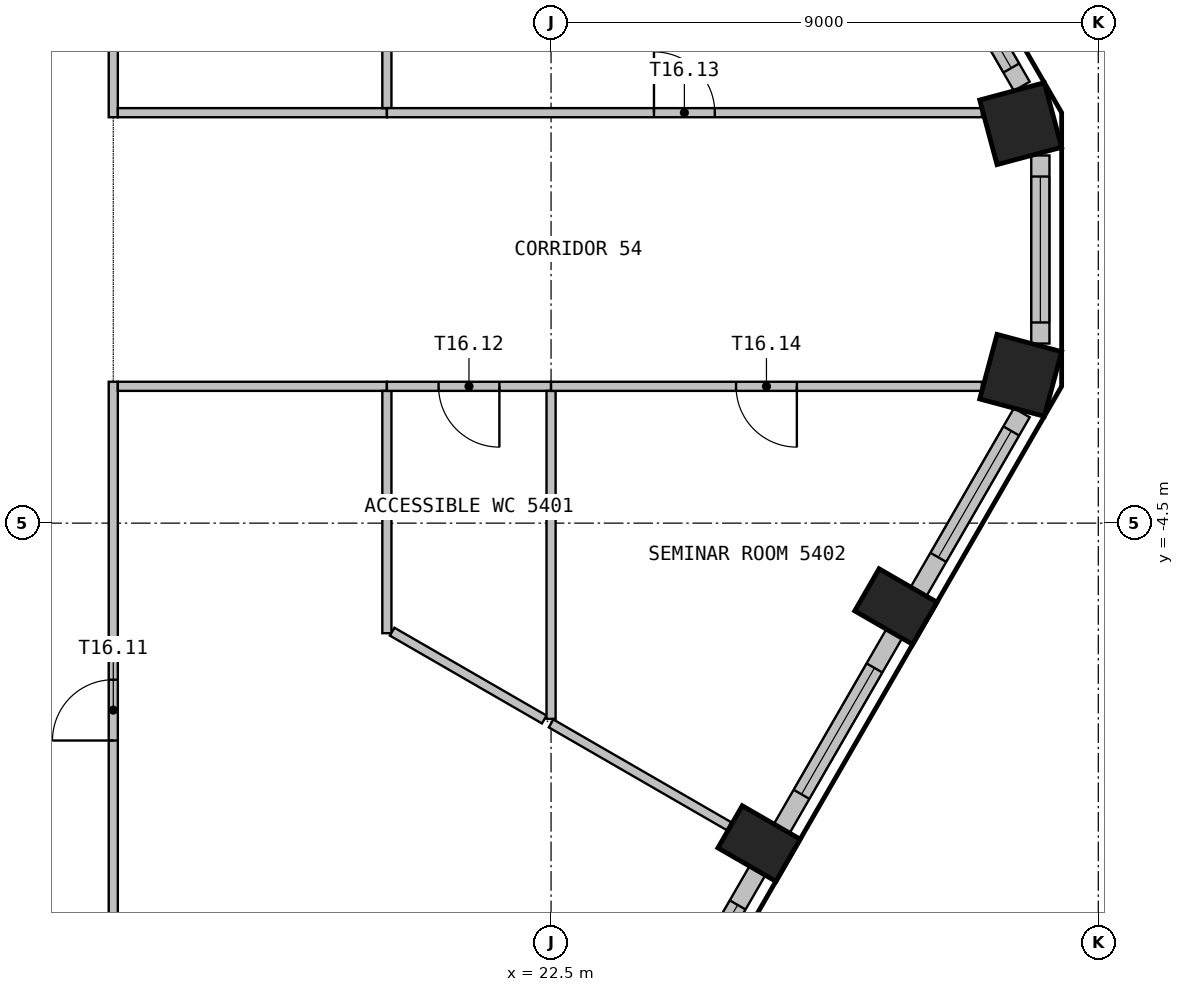
"""IFC4 building model, lengths in metres.
Left out: names, types, materials, properties, quantities, classifications, styles, units other than length and angle.
Written with IfcOpenShell. Run it as: python <this file> out.ifc"""

import sys

from ifc_helpers import new_model, si_unit, direction, frame, frame_2d, origin, origin_2d, place, context, subcontext, project, spatial, rectangle, extrude, element, fill, save


model = new_model("IFC4")
c1 = context("Model", 3, precision=1e-05, world=origin(), true_north=direction((0.0, 1.0)))
c2 = subcontext(c1, "Body", "Model", "MODEL_VIEW")
j1 = project(units=[si_unit("LENGTHUNIT", "METRE"), si_unit("PLANEANGLEUNIT", "RADIAN")], contexts=[c1])
p1 = place(None, origin())
s1 = spatial("IfcSite", under=j1, at=p1, CompositionType="ELEMENT")
p2 = place(p1, origin())
s2 = spatial("IfcBuilding", under=s1, at=p2, CompositionType="ELEMENT")
p3 = place(p2, frame((0.0, 0.0, 219.0)))
s3 = spatial("IfcBuildingStorey", under=s2, at=p3, CompositionType="ELEMENT", Elevation=219.0)
for number, where, z_axis, x_axis in (
    (1, (25.921, -9.769, 0.0), (0.0, 0.0, 1.0), (0.5, 0.866, 0.0)),
    (2, (28.171, -5.872, 0.0), (0.0, 0.0, 1.0), (0.5, 0.866, 0.0)),
):
    element("IfcColumn", number, at=place(p3, frame(where, z_axis=z_axis, x_axis=x_axis)), inside=s3, PredefinedType="COLUMN", context=c2, shape_type="SweptSolid", body=[
        extrude(rectangle(XDim=0.8, YDim=1.1, at=origin_2d()), origin(), (0.0, 0.0, 1.0), 3.55),
    ])
for number, where, z_axis, x_axis in (
    (3, (30.223, -2.07, 0.0), (0.0, 0.0, 1.0), (0.259, 0.966, 0.0)),
    (4, (30.223, 2.07, 0.0), (0.0, 0.0, 1.0), (-0.259, 0.966, 0.0)),
):
    element("IfcColumn", number, at=place(p3, frame(where, z_axis=z_axis, x_axis=x_axis)), inside=s3, PredefinedType="COLUMN", context=c2, shape_type="SweptSolid", body=[
        extrude(rectangle(XDim=1.1, YDim=1.1, at=origin_2d()), origin(), (0.0, 0.0, 1.0), 3.55),
    ])
p4 = place(p3, frame((24.044, -13.419, 0.0), z_axis=(0.0, 0.0, 1.0), x_axis=(0.500029062817, 0.866008623709, 0.0)))
e5 = element("IfcWall", 5, at=p4, inside=s3, PredefinedType="SOLIDWALL", context=c2, shape_type="SweptSolid", body=[
    extrude(rectangle(XDim=3.699, YDim=0.3, at=frame_2d((1.85, 0.0))), origin(), (0.0, 0.0, 1.0), 3.55),
])
p5 = place(p4, frame((0.649, 0.0, 0.9)))
e6 = element("IfcOpeningElement", 6, at=p5, cuts=e5, PredefinedType="OPENING", context=c2, shape_type="SweptSolid", body=[
    extrude(rectangle(XDim=2.4, YDim=2.1, at=frame_2d((1.2, 1.05))), frame((0.0, 0.16, 0.0), z_axis=(0.0, -1.0, 0.0), x_axis=(1.0, 0.0, 0.0)), (0.0, 0.0, 1.0), 0.32),
])
p6 = place(p3, frame((26.294, -9.522, 0.0), z_axis=(0.0, 0.0, 1.0), x_axis=(0.500029062817, 0.866008623709, 0.0)))
e7 = element("IfcWall", 7, at=p6, inside=s3, PredefinedType="SOLIDWALL", context=c2, shape_type="SweptSolid", body=[
    extrude(rectangle(XDim=3.699, YDim=0.3, at=frame_2d((1.85, 0.0))), origin(), (0.0, 0.0, 1.0), 3.55),
])
p7 = place(p6, frame((0.649, 0.0, 0.9)))
e8 = element("IfcOpeningElement", 8, at=p7, cuts=e7, PredefinedType="OPENING", context=c2, shape_type="SweptSolid", body=[
    extrude(rectangle(XDim=2.4, YDim=2.1, at=frame_2d((1.2, 1.05))), frame((0.0, 0.16, 0.0), z_axis=(0.0, -1.0, 0.0), x_axis=(1.0, 0.0, 0.0)), (0.0, 0.0, 1.0), 0.32),
])
p8 = place(p3, frame((28.544, -5.625, 0.0), z_axis=(0.0, 0.0, 1.0), x_axis=(0.500012868213, 0.866017974191, 0.0)))
e9 = element("IfcWall", 9, at=p8, inside=s3, PredefinedType="SOLIDWALL", context=c2, shape_type="SweptSolid", body=[
    extrude(rectangle(XDim=3.396, YDim=0.3, at=frame_2d((1.698, 0.0))), origin(), (0.0, 0.0, 1.0), 3.55),
])
p9 = place(p8, frame((0.649, 0.0, 0.9)))
e10 = element("IfcOpeningElement", 10, at=p9, cuts=e9, PredefinedType="OPENING", context=c2, shape_type="SweptSolid", body=[
    extrude(rectangle(XDim=2.4, YDim=2.1, at=frame_2d((1.2, 1.05))), frame((0.0, 0.16, 0.0), z_axis=(0.0, -1.0, 0.0), x_axis=(1.0, 0.0, 0.0)), (0.0, 0.0, 1.0), 0.32),
])
p10 = place(p3, frame((30.547, -1.546, 0.0), z_axis=(0.0, 0.0, 1.0), x_axis=(0.0, 1.0, 0.0)))
e11 = element("IfcWall", 11, at=p10, inside=s3, PredefinedType="SOLIDWALL", context=c2, shape_type="SweptSolid", body=[
    extrude(rectangle(XDim=3.093, YDim=0.3, at=frame_2d((1.546, 0.0))), origin(), (0.0, 0.0, 1.0), 3.55),
])
p11 = place(p10, frame((0.346, 0.0, 0.9)))
e12 = element("IfcOpeningElement", 12, at=p11, cuts=e11, PredefinedType="OPENING", context=c2, shape_type="SweptSolid", body=[
    extrude(rectangle(XDim=2.4, YDim=2.1, at=frame_2d((1.2, 1.05))), frame((0.0, 0.16, 0.0), z_axis=(0.0, -1.0, 0.0), x_axis=(1.0, 0.0, 0.0)), (0.0, 0.0, 1.0), 0.32),
])
p12 = place(p3, frame((30.242, 2.684, 0.0), z_axis=(0.0, 0.0, 1.0), x_axis=(-0.500012868213, 0.866017974191, 0.0)))
e13 = element("IfcWall", 13, at=p12, inside=s3, PredefinedType="SOLIDWALL", context=c2, shape_type="SweptSolid", body=[
    extrude(rectangle(XDim=3.396, YDim=0.3, at=frame_2d((1.698, 0.0))), origin(), (0.0, 0.0, 1.0), 3.55),
])
p13 = place(p12, frame((0.346, 0.0, 0.9)))
e14 = element("IfcOpeningElement", 14, at=p13, cuts=e13, PredefinedType="OPENING", context=c2, shape_type="SweptSolid", body=[
    extrude(rectangle(XDim=2.4, YDim=2.1, at=frame_2d((1.2, 1.05))), frame((0.0, 0.16, 0.0), z_axis=(0.0, -1.0, 0.0), x_axis=(1.0, 0.0, 0.0)), (0.0, 0.0, 1.0), 0.32),
])
p14 = place(p3, frame((15.3, -12.975, 0.0), z_axis=(0.0, 0.0, 1.0), x_axis=(0.0, 1.0, 0.0)))
e15 = element("IfcWall", 15, at=p14, inside=s3, PredefinedType="PARTITIONING", context=c2, shape_type="SweptSolid", body=[
    extrude(rectangle(XDim=10.8, YDim=0.15, at=frame_2d((5.4, 0.0))), origin(), (0.0, 0.0, 1.0), 3.55),
])
p15 = place(p14, frame((4.9, 0.0, 0.0)))
e16 = element("IfcOpeningElement", 16, at=p15, cuts=e15, PredefinedType="OPENING", context=c2, shape_type="SweptSolid", body=[
    extrude(rectangle(XDim=1.0, YDim=2.1, at=frame_2d((0.5, 1.05))), frame((0.0, 0.085, 0.0), z_axis=(0.0, -1.0, 0.0), x_axis=(1.0, 0.0, 0.0)), (0.0, 0.0, 1.0), 0.17),
])
p16 = place(p3, frame((19.8, -2.25, 0.0), z_axis=(0.0, 0.0, 1.0), x_axis=(-1.0, 0.0, 0.0)))
e17 = element("IfcWall", 17, at=p16, inside=s3, PredefinedType="PARTITIONING", context=c2, shape_type="SweptSolid", body=[
    extrude(rectangle(XDim=4.425, YDim=0.15, at=frame_2d((2.212, 0.0))), origin(), (0.0, 0.0, 1.0), 3.55),
])
p17 = place(p3, frame((15.3, 2.175, 0.0), z_axis=(0.0, 0.0, 1.0), x_axis=(0.0, 1.0, 0.0)))
e18 = element("IfcWall", 18, at=p17, inside=s3, PredefinedType="PARTITIONING", context=c2, shape_type="SweptSolid", body=[
    extrude(rectangle(XDim=10.8, YDim=0.15, at=frame_2d((5.4, 0.0))), origin(), (0.0, 0.0, 1.0), 3.55),
])
p18 = place(p17, frame((4.9, 0.0, 0.0)))
e19 = element("IfcOpeningElement", 19, at=p18, cuts=e18, PredefinedType="OPENING", context=c2, shape_type="SweptSolid", body=[
    extrude(rectangle(XDim=1.0, YDim=2.1, at=frame_2d((0.5, 1.05))), frame((0.0, 0.085, 0.0), z_axis=(0.0, -1.0, 0.0), x_axis=(1.0, 0.0, 0.0)), (0.0, 0.0, 1.0), 0.17),
])
p19 = place(p3, frame((15.375, 2.25, 0.0), z_axis=(0.0, 0.0, 1.0), x_axis=(1.0, 0.0, 0.0)))
e20 = element("IfcWall", 20, at=p19, inside=s3, PredefinedType="PARTITIONING", context=c2, shape_type="SweptSolid", body=[
    extrude(rectangle(XDim=4.425, YDim=0.15, at=frame_2d((2.212, 0.0))), origin(), (0.0, 0.0, 1.0), 3.55),
])
p20 = place(p3, frame((19.8, -2.325, 0.0), z_axis=(0.0, 0.0, 1.0), x_axis=(0.0, -1.0, 0.0)))
e21 = element("IfcWall", 21, at=p20, inside=s3, PredefinedType="PARTITIONING", context=c2, shape_type="SweptSolid", body=[
    extrude(rectangle(XDim=3.985, YDim=0.15, at=frame_2d((1.993, 0.0))), origin(), (0.0, 0.0, 1.0), 3.55),
])
p21 = place(p3, frame((19.887, -6.285, 0.0), z_axis=(0.0, 0.0, 1.0), x_axis=(0.865981426562, -0.500076163049, 0.0)))
e22 = element("IfcWall", 22, at=p21, inside=s3, PredefinedType="PARTITIONING", context=c2, shape_type="SweptSolid", body=[
    extrude(rectangle(XDim=2.888, YDim=0.15, at=frame_2d((1.444, 0.0))), origin(), (0.0, 0.0, 1.0), 3.55),
])
p22 = place(p3, frame((22.5, -2.25, 0.0), z_axis=(0.0, 0.0, 1.0), x_axis=(-1.0, 0.0, 0.0)))
e23 = element("IfcWall", 23, at=p22, inside=s3, PredefinedType="PARTITIONING", context=c2, shape_type="SweptSolid", body=[
    extrude(rectangle(XDim=2.7, YDim=0.15, at=frame_2d((1.35, 0.0))), origin(), (0.0, 0.0, 1.0), 3.55),
])
p23 = place(p22, frame((0.85, 0.0, 0.0)))
e24 = element("IfcOpeningElement", 24, at=p23, cuts=e23, PredefinedType="OPENING", context=c2, shape_type="SweptSolid", body=[
    extrude(rectangle(XDim=1.0, YDim=2.1, at=frame_2d((0.5, 1.05))), frame((0.0, 0.085, 0.0), z_axis=(0.0, -1.0, 0.0), x_axis=(1.0, 0.0, 0.0)), (0.0, 0.0, 1.0), 0.17),
])
p24 = place(p3, frame((19.8, 16.553, 0.0), z_axis=(0.0, 0.0, 1.0), x_axis=(0.0, -1.0, 0.0)))
e25 = element("IfcWall", 25, at=p24, inside=s3, PredefinedType="PARTITIONING", context=c2, shape_type="SweptSolid", body=[
    extrude(rectangle(XDim=14.228, YDim=0.15, at=frame_2d((7.114, 0.0))), origin(), (0.0, 0.0, 1.0), 3.55),
])
p25 = place(p3, frame((19.8, 2.25, 0.0), z_axis=(0.0, 0.0, 1.0), x_axis=(1.0, 0.0, 0.0)))
e26 = element("IfcWall", 26, at=p25, inside=s3, PredefinedType="PARTITIONING", context=c2, shape_type="SweptSolid", body=[
    extrude(rectangle(XDim=9.785, YDim=0.15, at=frame_2d((4.893, 0.0))), origin(), (0.0, 0.0, 1.0), 3.55),
])
p26 = place(p25, frame((4.393, 0.0, 0.0)))
e27 = element("IfcOpeningElement", 27, at=p26, cuts=e26, PredefinedType="OPENING", context=c2, shape_type="SweptSolid", body=[
    extrude(rectangle(XDim=1.0, YDim=2.1, at=frame_2d((0.5, 1.05))), frame((0.0, 0.085, 0.0), z_axis=(0.0, -1.0, 0.0), x_axis=(1.0, 0.0, 0.0)), (0.0, 0.0, 1.0), 0.17),
])
p27 = place(p3, frame((22.5, -2.325, 0.0), z_axis=(0.0, 0.0, 1.0), x_axis=(0.0, -1.0, 0.0)))
e28 = element("IfcWall", 28, at=p27, inside=s3, PredefinedType="PARTITIONING", context=c2, shape_type="SweptSolid", body=[
    extrude(rectangle(XDim=5.394, YDim=0.15, at=frame_2d((2.697, 0.0))), origin(), (0.0, 0.0, 1.0), 3.55),
])
p28 = place(p3, frame((22.5, -7.794, 0.0), z_axis=(0.0, 0.0, 1.0), x_axis=(0.866007567725, -0.50003089169, 0.0)))
e29 = element("IfcWall", 29, at=p28, inside=s3, PredefinedType="PARTITIONING", context=c2, shape_type="SweptSolid", body=[
    extrude(rectangle(XDim=3.38, YDim=0.15, at=frame_2d((1.69, 0.0))), origin(), (0.0, 0.0, 1.0), 3.55),
])
p29 = place(p3, frame((29.585, -2.25, 0.0), z_axis=(0.0, 0.0, 1.0), x_axis=(-1.0, 0.0, 0.0)))
e30 = element("IfcWall", 30, at=p29, inside=s3, PredefinedType="PARTITIONING", context=c2, shape_type="SweptSolid", body=[
    extrude(rectangle(XDim=7.085, YDim=0.15, at=frame_2d((3.542, 0.0))), origin(), (0.0, 0.0, 1.0), 3.55),
])
p30 = place(p29, frame((3.042, 0.0, 0.0)))
e31 = element("IfcOpeningElement", 31, at=p30, cuts=e30, PredefinedType="OPENING", context=c2, shape_type="SweptSolid", body=[
    extrude(rectangle(XDim=1.0, YDim=2.1, at=frame_2d((0.5, 1.05))), frame((0.0, 0.085, 0.0), z_axis=(0.0, -1.0, 0.0), x_axis=(1.0, 0.0, 0.0)), (0.0, 0.0, 1.0), 0.17),
])
p31 = place(p5, origin())
e32 = element("IfcWindow", 32, at=p31, inside=s3, PartitioningType="SINGLE_PANEL", PredefinedType="WINDOW", context=c2, shape_type="SweptSolid", body=[
    extrude(rectangle(XDim=2.4, YDim=2.1, at=frame_2d((1.2, 1.05))), frame((0.0, 0.03, 0.0), z_axis=(0.0, -1.0, 0.0), x_axis=(1.0, 0.0, 0.0)), (0.0, 0.0, 1.0), 0.06),
])
fill(e6, e32)
p32 = place(p7, origin())
e33 = element("IfcWindow", 33, at=p32, inside=s3, PartitioningType="SINGLE_PANEL", PredefinedType="WINDOW", context=c2, shape_type="SweptSolid", body=[
    extrude(rectangle(XDim=2.4, YDim=2.1, at=frame_2d((1.2, 1.05))), frame((0.0, 0.03, 0.0), z_axis=(0.0, -1.0, 0.0), x_axis=(1.0, 0.0, 0.0)), (0.0, 0.0, 1.0), 0.06),
])
fill(e8, e33)
p33 = place(p9, origin())
e34 = element("IfcWindow", 34, at=p33, inside=s3, PartitioningType="SINGLE_PANEL", PredefinedType="WINDOW", context=c2, shape_type="SweptSolid", body=[
    extrude(rectangle(XDim=2.4, YDim=2.1, at=frame_2d((1.2, 1.05))), frame((0.0, 0.03, 0.0), z_axis=(0.0, -1.0, 0.0), x_axis=(1.0, 0.0, 0.0)), (0.0, 0.0, 1.0), 0.06),
])
fill(e10, e34)
p34 = place(p11, origin())
e35 = element("IfcWindow", 35, at=p34, inside=s3, PartitioningType="SINGLE_PANEL", PredefinedType="WINDOW", context=c2, shape_type="SweptSolid", body=[
    extrude(rectangle(XDim=2.4, YDim=2.1, at=frame_2d((1.2, 1.05))), frame((0.0, 0.03, 0.0), z_axis=(0.0, -1.0, 0.0), x_axis=(1.0, 0.0, 0.0)), (0.0, 0.0, 1.0), 0.06),
])
fill(e12, e35)
p35 = place(p13, origin())
e36 = element("IfcWindow", 36, at=p35, inside=s3, PartitioningType="SINGLE_PANEL", PredefinedType="WINDOW", context=c2, shape_type="SweptSolid", body=[
    extrude(rectangle(XDim=2.4, YDim=2.1, at=frame_2d((1.2, 1.05))), frame((0.0, 0.03, 0.0), z_axis=(0.0, -1.0, 0.0), x_axis=(1.0, 0.0, 0.0)), (0.0, 0.0, 1.0), 0.06),
])
fill(e14, e36)
p36 = place(p15, origin())
e37 = element("IfcDoor", 37, at=p36, inside=s3, OperationType="SINGLE_SWING_RIGHT", PredefinedType="DOOR", context=c2, shape_type="SweptSolid", body=[
    extrude(rectangle(XDim=1.0, YDim=2.1, at=frame_2d((0.5, 1.05))), frame((0.0, 0.025, 0.0), z_axis=(0.0, -1.0, 0.0), x_axis=(1.0, 0.0, 0.0)), (0.0, 0.0, 1.0), 0.05),
])
fill(e16, e37)
p37 = place(p23, origin())
e38 = element("IfcDoor", 38, at=p37, inside=s3, OperationType="SINGLE_SWING_LEFT", PredefinedType="DOOR", context=c2, shape_type="SweptSolid", body=[
    extrude(rectangle(XDim=1.0, YDim=2.1, at=frame_2d((0.5, 1.05))), frame((0.0, 0.025, 0.0), z_axis=(0.0, -1.0, 0.0), x_axis=(1.0, 0.0, 0.0)), (0.0, 0.0, 1.0), 0.05),
])
fill(e24, e38)
p38 = place(p26, origin())
e39 = element("IfcDoor", 39, at=p38, inside=s3, OperationType="SINGLE_SWING_RIGHT", PredefinedType="DOOR", context=c2, shape_type="SweptSolid", body=[
    extrude(rectangle(XDim=1.0, YDim=2.1, at=frame_2d((0.5, 1.05))), frame((0.0, 0.025, 0.0), z_axis=(0.0, -1.0, 0.0), x_axis=(1.0, 0.0, 0.0)), (0.0, 0.0, 1.0), 0.05),
])
fill(e27, e39)
p39 = place(p30, origin())
e40 = element("IfcDoor", 40, at=p39, inside=s3, OperationType="SINGLE_SWING_LEFT", PredefinedType="DOOR", context=c2, shape_type="SweptSolid", body=[
    extrude(rectangle(XDim=1.0, YDim=2.1, at=frame_2d((0.5, 1.05))), frame((0.0, 0.025, 0.0), z_axis=(0.0, -1.0, 0.0), x_axis=(1.0, 0.0, 0.0)), (0.0, 0.0, 1.0), 0.05),
])
fill(e31, e40)
save(model, sys.argv[1])
